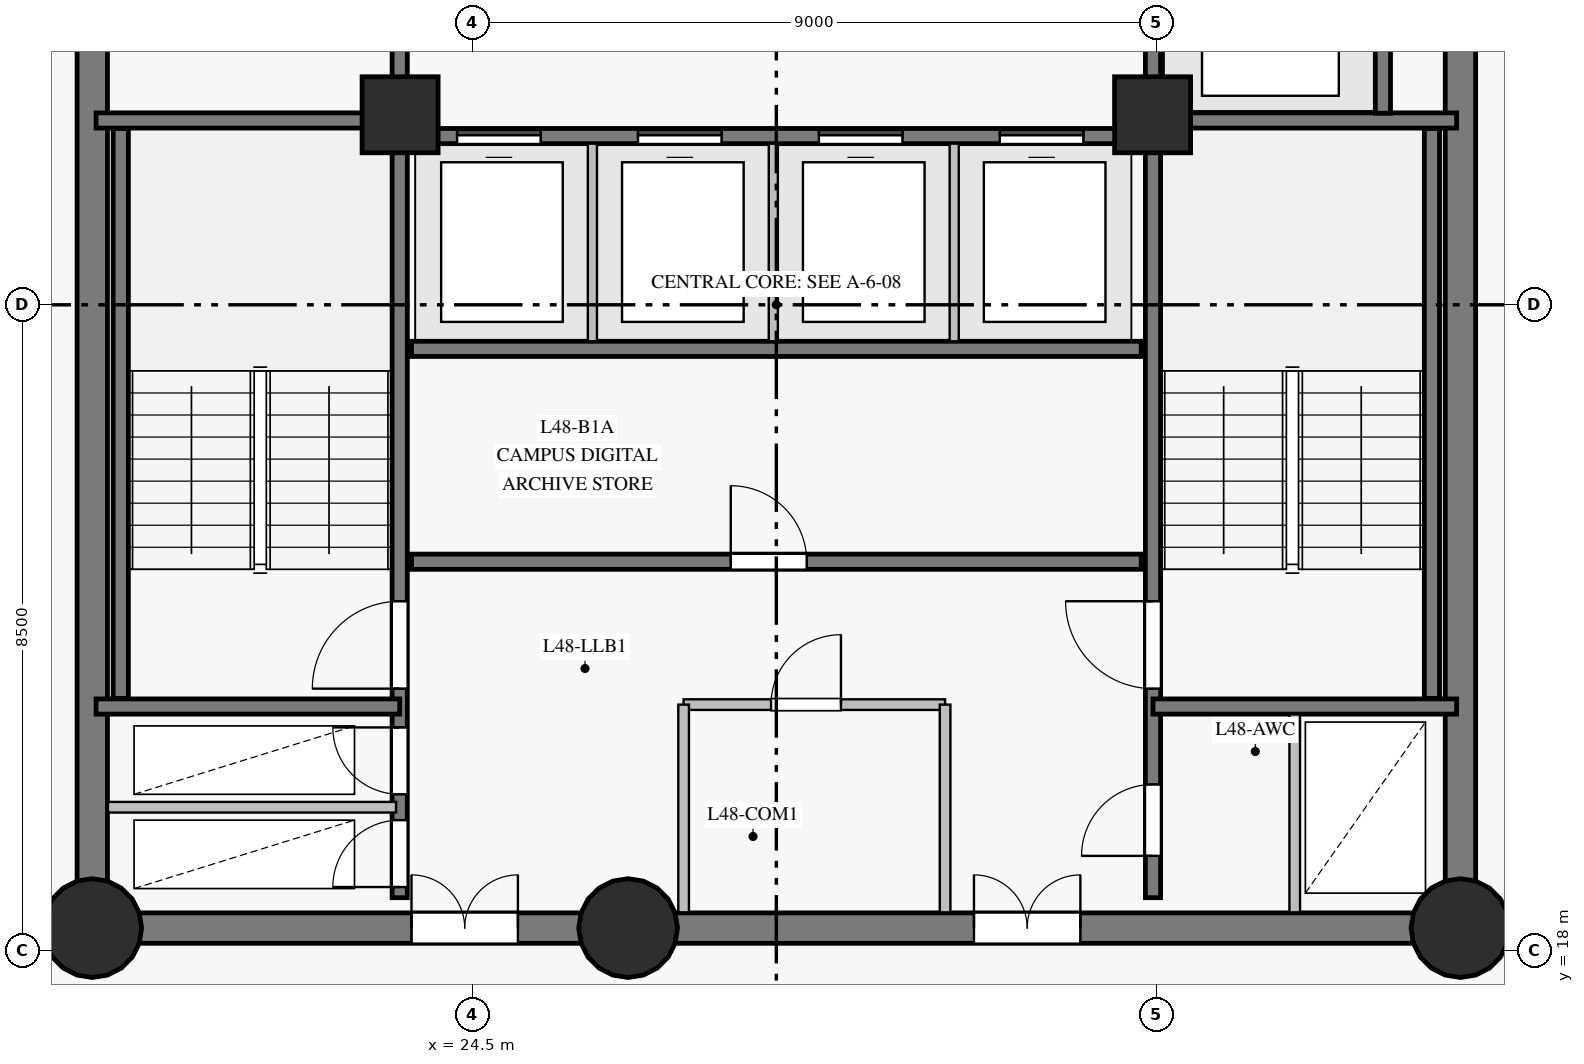
"""IFC4 building model, lengths in metres.
Left out: names, types, materials, properties, quantities, classifications, styles, units other than length and angle.
Written with IfcOpenShell. Run it as: python <this file> out.ifc"""

import sys

from ifc_helpers import new_model, si_unit, direction, frame, frame_2d, origin, origin_with_axes, origin_2d, place, context, subcontext, project, spatial, rectangle, circle, extrude, source, transform, mapped, element, fill, save


model = new_model("IFC4")
c1 = context("Model", 3, precision=1e-05, world=origin(), true_north=direction((0.0, 1.0)))
c2 = subcontext(c1, "Body", "Model", "MODEL_VIEW")
j1 = project(units=[si_unit("LENGTHUNIT", "METRE"), si_unit("PLANEANGLEUNIT", "RADIAN")], contexts=[c1])
p1 = place(None, origin())
s1 = spatial("IfcSite", under=j1, at=p1, CompositionType="ELEMENT")
p2 = place(p1, origin())
s2 = spatial("IfcBuilding", under=s1, at=p2, CompositionType="ELEMENT")
p3 = place(p2, frame((0.0, 0.0, 168.75)))
s3 = spatial("IfcBuildingStorey", under=s2, at=p3, CompositionType="ELEMENT", Elevation=168.75)
p4 = place(p3, frame((19.5, 18.3, 0.0), z_axis=(0.0, 0.0, 1.0), x_axis=(1.0, 0.0, 0.0)))
e1 = element("IfcWall", 1, at=p4, inside=s3, PredefinedType="SHEAR", context=c2, shape_type="SweptSolid", body=[
    extrude(rectangle(XDim=7.05, YDim=0.4, at=frame_2d((3.525, 0.0))), origin(), (0.0, 0.0, 1.0), 2.825),
])
p5 = place(p4, frame((4.2, 0.0, 0.0)))
e2 = element("IfcOpeningElement", 2, at=p5, cuts=e1, PredefinedType="OPENING", context=c2, shape_type="SweptSolid", body=[
    extrude(rectangle(XDim=1.4, YDim=2.2, at=frame_2d((0.7, 1.1))), frame((0.0, 0.21, 0.0), z_axis=(0.0, -1.0, 0.0), x_axis=(1.0, 0.0, 0.0)), (0.0, 0.0, 1.0), 0.42),
])
p6 = place(p3, frame((26.55, 18.3, 0.0), z_axis=(0.0, 0.0, 1.0), x_axis=(1.0, 0.0, 0.0)))
e3 = element("IfcWall", 3, at=p6, inside=s3, PredefinedType="SHEAR", context=c2, shape_type="SweptSolid", body=[
    extrude(rectangle(XDim=10.95, YDim=0.4, at=frame_2d((5.475, 0.0))), origin(), (0.0, 0.0, 1.0), 2.825),
])
p7 = place(p6, frame((4.55, 0.0, 0.0)))
e4 = element("IfcOpeningElement", 4, at=p7, cuts=e3, PredefinedType="OPENING", context=c2, shape_type="SweptSolid", body=[
    extrude(rectangle(XDim=1.4, YDim=2.2, at=frame_2d((0.7, 1.1))), frame((0.0, 0.21, 0.0), z_axis=(0.0, -1.0, 0.0), x_axis=(1.0, 0.0, 0.0)), (0.0, 0.0, 1.0), 0.42),
])
p8 = place(p3, frame((37.5, 18.3, 0.0), z_axis=(0.0, 0.0, 1.0), x_axis=(0.0, 1.0, 0.0)))
e5 = element("IfcWall", 5, at=p8, inside=s3, PredefinedType="SHEAR", context=c2, shape_type="SweptSolid", body=[
    extrude(rectangle(XDim=16.4, YDim=0.4, at=frame_2d((8.2, 0.0))), origin(), (0.0, 0.0, 1.0), 2.825),
])
p9 = place(p8, frame((14.15, 0.0, 0.0)))
e6 = element("IfcOpeningElement", 6, at=p9, cuts=e5, PredefinedType="OPENING", context=c2, shape_type="SweptSolid", body=[
    extrude(rectangle(XDim=1.2, YDim=2.15, at=frame_2d((0.6, 1.075))), frame((0.0, 0.21, 0.0), z_axis=(0.0, -1.0, 0.0), x_axis=(1.0, 0.0, 0.0)), (0.0, 0.0, 1.0), 0.42),
])
p10 = place(p3, frame((19.5, 34.7, 0.0), z_axis=(0.0, 0.0, 1.0), x_axis=(0.0, -1.0, 0.0)))
e7 = element("IfcWall", 7, at=p10, inside=s3, PredefinedType="SHEAR", context=c2, shape_type="SweptSolid", body=[
    extrude(rectangle(XDim=16.4, YDim=0.4, at=frame_2d((8.2, 0.0))), origin(), (0.0, 0.0, 1.0), 2.825),
])
p11 = place(p10, frame((3.1, 0.0, 0.0)))
e8 = element("IfcOpeningElement", 8, at=p11, cuts=e7, PredefinedType="OPENING", context=c2, shape_type="SweptSolid", body=[
    extrude(rectangle(XDim=1.1, YDim=2.15, at=frame_2d((0.55, 1.075))), frame((0.0, 0.21, 0.0), z_axis=(0.0, -1.0, 0.0), x_axis=(1.0, 0.0, 0.0)), (0.0, 0.0, 1.0), 0.42),
])
m1 = source(origin_with_axes(), c2, "Body", "SweptSolid", [
    extrude(circle(Radius=0.65, at=origin_2d()), origin(), (0.0, 0.0, 1.0), 3.05),
])
for number, where, z_axis, x_axis in (
    (9, (19.5, 18.3, 0.0), (0.0, 0.0, 1.0), (1.0, 0.0, 0.0)),
    (10, (26.55, 18.3, 0.0), (0.0, 0.0, 1.0), (1.0, 0.0, 0.0)),
    (11, (37.5, 18.3, 0.0), (0.0, 0.0, 1.0), (1.0, 0.0, 0.0)),
):
    element("IfcColumn", number, at=place(p3, frame(where, z_axis=z_axis, x_axis=x_axis)), inside=s3, PredefinedType="COLUMN", context=c2, shape_type="MappedRepresentation", body=[
        mapped(m1, transform((0.0, 0.0, 0.0), scale=1.0)),
    ])
m2 = source(origin_with_axes(), c2, "Body", "SweptSolid", [
    extrude(rectangle(XDim=1.0, YDim=1.0, at=origin_2d()), origin(), (0.0, 0.0, 1.0), 3.05),
])
for number, where, z_axis, x_axis in (
    (12, (23.55, 29.0, 0.0), (0.0, 0.0, 1.0), (1.0, 0.0, 0.0)),
    (13, (33.45, 29.0, 0.0), (0.0, 0.0, 1.0), (1.0, 0.0, 0.0)),
):
    element("IfcColumn", number, at=place(p3, frame(where, z_axis=z_axis, x_axis=x_axis)), inside=s3, PredefinedType="COLUMN", context=c2, shape_type="MappedRepresentation", body=[
        mapped(m2, transform((0.0, 0.0, 0.0), scale=1.0)),
    ])
p12 = place(p3, frame((23.545, 18.7, 0.0), z_axis=(0.0, 0.0, 1.0), x_axis=(0.0, 1.0, 0.0)))
e14 = element("IfcWall", 14, at=p12, inside=s3, PredefinedType="SHEAR", context=c2, shape_type="SweptSolid", body=[
    extrude(rectangle(XDim=15.6, YDim=0.2, at=frame_2d((7.8, 0.0))), origin(), (0.0, 0.0, 1.0), 2.825),
])
p13 = place(p12, frame((2.75, 0.0, 0.0)))
e15 = element("IfcOpeningElement", 15, at=p13, cuts=e14, PredefinedType="OPENING", context=c2, shape_type="SweptSolid", body=[
    extrude(rectangle(XDim=1.15, YDim=2.15, at=frame_2d((0.575, 1.075))), frame((0.0, 0.11, 0.0), z_axis=(0.0, -1.0, 0.0), x_axis=(1.0, 0.0, 0.0)), (0.0, 0.0, 1.0), 0.22),
])
p14 = place(p12, frame((0.14, 0.0, 0.0)))
e16 = element("IfcOpeningElement", 16, at=p14, cuts=e14, PredefinedType="OPENING", context=c2, shape_type="SweptSolid", body=[
    extrude(rectangle(XDim=0.88, YDim=2.1, at=frame_2d((0.44, 1.05))), frame((0.0, 0.11, 0.0), z_axis=(0.0, -1.0, 0.0), x_axis=(1.0, 0.0, 0.0)), (0.0, 0.0, 1.0), 0.22),
])
p15 = place(p12, frame((1.36, 0.0, 0.0)))
e17 = element("IfcOpeningElement", 17, at=p15, cuts=e14, PredefinedType="OPENING", context=c2, shape_type="SweptSolid", body=[
    extrude(rectangle(XDim=0.88, YDim=2.1, at=frame_2d((0.44, 1.05))), frame((0.0, 0.11, 0.0), z_axis=(0.0, -1.0, 0.0), x_axis=(1.0, 0.0, 0.0)), (0.0, 0.0, 1.0), 0.22),
])
p16 = place(p12, frame((12.1, 0.0, 0.0)))
e18 = element("IfcOpeningElement", 18, at=p16, cuts=e14, PredefinedType="OPENING", context=c2, shape_type="SweptSolid", body=[
    extrude(rectangle(XDim=1.12, YDim=2.15, at=frame_2d((0.56, 1.075))), frame((0.0, 0.11, 0.0), z_axis=(0.0, -1.0, 0.0), x_axis=(1.0, 0.0, 0.0)), (0.0, 0.0, 1.0), 0.22),
])
p17 = place(p12, frame((14.05, 0.0, 0.0)))
e19 = element("IfcOpeningElement", 19, at=p17, cuts=e14, PredefinedType="OPENING", context=c2, shape_type="SweptSolid", body=[
    extrude(rectangle(XDim=1.12, YDim=2.15, at=frame_2d((0.56, 1.075))), frame((0.0, 0.11, 0.0), z_axis=(0.0, -1.0, 0.0), x_axis=(1.0, 0.0, 0.0)), (0.0, 0.0, 1.0), 0.22),
])
p18 = place(p3, frame((33.455, 18.7, 0.0), z_axis=(0.0, 0.0, 1.0), x_axis=(0.0, 1.0, 0.0)))
e20 = element("IfcWall", 20, at=p18, inside=s3, PredefinedType="SHEAR", context=c2, shape_type="SweptSolid", body=[
    extrude(rectangle(XDim=15.6, YDim=0.2, at=frame_2d((7.8, 0.0))), origin(), (0.0, 0.0, 1.0), 2.825),
])
p19 = place(p18, frame((2.75, 0.0, 0.0)))
e21 = element("IfcOpeningElement", 21, at=p19, cuts=e20, PredefinedType="OPENING", context=c2, shape_type="SweptSolid", body=[
    extrude(rectangle(XDim=1.15, YDim=2.15, at=frame_2d((0.575, 1.075))), frame((0.0, 0.11, 0.0), z_axis=(0.0, -1.0, 0.0), x_axis=(1.0, 0.0, 0.0)), (0.0, 0.0, 1.0), 0.22),
])
p20 = place(p18, frame((0.55, 0.0, 0.0)))
e22 = element("IfcOpeningElement", 22, at=p20, cuts=e20, PredefinedType="OPENING", context=c2, shape_type="SweptSolid", body=[
    extrude(rectangle(XDim=0.94, YDim=2.1, at=frame_2d((0.47, 1.05))), frame((0.0, 0.11, 0.0), z_axis=(0.0, -1.0, 0.0), x_axis=(1.0, 0.0, 0.0)), (0.0, 0.0, 1.0), 0.22),
])
p21 = place(p3, frame((23.7, 23.12, 0.0), z_axis=(0.0, 0.0, 1.0), x_axis=(1.0, 0.0, 0.0)))
e23 = element("IfcWall", 23, at=p21, inside=s3, PredefinedType="SHEAR", context=c2, shape_type="SweptSolid", body=[
    extrude(rectangle(XDim=9.6, YDim=0.2, at=frame_2d((4.8, 0.0))), origin(), (0.0, 0.0, 1.0), 2.825),
])
p22 = place(p21, frame((4.2, 0.0, 0.0)))
e24 = element("IfcOpeningElement", 24, at=p22, cuts=e23, PredefinedType="OPENING", context=c2, shape_type="SweptSolid", body=[
    extrude(rectangle(XDim=1.0, YDim=2.15, at=frame_2d((0.5, 1.075))), frame((0.0, 0.11, 0.0), z_axis=(0.0, -1.0, 0.0), x_axis=(1.0, 0.0, 0.0)), (0.0, 0.0, 1.0), 0.22),
])
p23 = place(p3, frame((23.7, 25.92, 0.0), z_axis=(0.0, 0.0, 1.0), x_axis=(1.0, 0.0, 0.0)))
e25 = element("IfcWall", 25, at=p23, inside=s3, PredefinedType="SHEAR", context=c2, shape_type="SweptSolid", body=[
    extrude(rectangle(XDim=9.6, YDim=0.2, at=frame_2d((4.8, 0.0))), origin(), (0.0, 0.0, 1.0), 2.825),
])
p24 = place(p3, frame((23.7, 28.72, 0.0), z_axis=(0.0, 0.0, 1.0), x_axis=(1.0, 0.0, 0.0)))
e26 = element("IfcWall", 26, at=p24, inside=s3, PredefinedType="SHEAR", context=c2, shape_type="SweptSolid", body=[
    extrude(rectangle(XDim=9.6, YDim=0.2, at=frame_2d((4.8, 0.0))), origin(), (0.0, 0.0, 1.0), 2.825),
])
p25 = place(p24, frame((0.6, 0.0, 0.0)))
e27 = element("IfcOpeningElement", 27, at=p25, cuts=e26, PredefinedType="OPENING", context=c2, shape_type="SweptSolid", body=[
    extrude(rectangle(XDim=1.1, YDim=2.15, at=frame_2d((0.55, 1.075))), frame((0.0, 0.11, 0.0), z_axis=(0.0, -1.0, 0.0), x_axis=(1.0, 0.0, 0.0)), (0.0, 0.0, 1.0), 0.22),
])
p26 = place(p24, frame((2.98, 0.0, 0.0)))
e28 = element("IfcOpeningElement", 28, at=p26, cuts=e26, PredefinedType="OPENING", context=c2, shape_type="SweptSolid", body=[
    extrude(rectangle(XDim=1.1, YDim=2.15, at=frame_2d((0.55, 1.075))), frame((0.0, 0.11, 0.0), z_axis=(0.0, -1.0, 0.0), x_axis=(1.0, 0.0, 0.0)), (0.0, 0.0, 1.0), 0.22),
])
p27 = place(p24, frame((5.36, 0.0, 0.0)))
e29 = element("IfcOpeningElement", 29, at=p27, cuts=e26, PredefinedType="OPENING", context=c2, shape_type="SweptSolid", body=[
    extrude(rectangle(XDim=1.1, YDim=2.15, at=frame_2d((0.55, 1.075))), frame((0.0, 0.11, 0.0), z_axis=(0.0, -1.0, 0.0), x_axis=(1.0, 0.0, 0.0)), (0.0, 0.0, 1.0), 0.22),
])
p28 = place(p24, frame((7.74, 0.0, 0.0)))
e30 = element("IfcOpeningElement", 30, at=p28, cuts=e26, PredefinedType="OPENING", context=c2, shape_type="SweptSolid", body=[
    extrude(rectangle(XDim=1.1, YDim=2.15, at=frame_2d((0.55, 1.075))), frame((0.0, 0.11, 0.0), z_axis=(0.0, -1.0, 0.0), x_axis=(1.0, 0.0, 0.0)), (0.0, 0.0, 1.0), 0.22),
])
for number, where, z_axis, x_axis in (
    (31, (19.875, 21.32, 0.0), (0.0, 0.0, 1.0), (0.0, 1.0, 0.0)),
    (32, (37.125, 21.32, 0.0), (0.0, 0.0, 1.0), (0.0, 1.0, 0.0)),
):
    element("IfcWall", number, at=place(p3, frame(where, z_axis=z_axis, x_axis=x_axis)), inside=s3, PredefinedType="SHEAR", context=c2, shape_type="SweptSolid", body=[
        extrude(rectangle(XDim=7.5, YDim=0.2, at=frame_2d((3.75, 0.0))), origin(), (0.0, 0.0, 1.0), 2.825),
    ])
for number, where, z_axis, x_axis in (
    (33, (33.455, 21.215, 0.0), (0.0, 0.0, 1.0), (1.0, 0.0, 0.0)),
    (34, (33.455, 28.925, 0.0), (0.0, 0.0, 1.0), (1.0, 0.0, 0.0)),
    (35, (19.55, 21.215, 0.0), (0.0, 0.0, 1.0), (1.0, 0.0, 0.0)),
    (36, (19.55, 28.925, 0.0), (0.0, 0.0, 1.0), (1.0, 0.0, 0.0)),
):
    element("IfcWall", number, at=place(p3, frame(where, z_axis=z_axis, x_axis=x_axis)), inside=s3, PredefinedType="SHEAR", context=c2, shape_type="SweptSolid", body=[
        extrude(rectangle(XDim=3.995, YDim=0.2, at=frame_2d((1.998, 0.0))), origin(), (0.0, 0.0, 1.0), 2.825),
    ])
p29 = place(p3, frame((36.48, 29.02, 0.0), z_axis=(0.0, 0.0, 1.0), x_axis=(0.0, 1.0, 0.0)))
e37 = element("IfcWall", 37, at=p29, inside=s3, PredefinedType="SHEAR", context=c2, shape_type="SweptSolid", body=[
    extrude(rectangle(XDim=2.86, YDim=0.2, at=frame_2d((1.43, 0.0))), origin(), (0.0, 0.0, 1.0), 2.825),
])
p30 = place(p3, frame((19.707, 19.89, 0.0), z_axis=(0.0, 0.0, 1.0), x_axis=(1.0, 0.0, 0.0)))
e38 = element("IfcWall", 38, at=p30, inside=s3, PredefinedType="PARTITIONING", context=c2, shape_type="SweptSolid", body=[
    extrude(rectangle(XDim=3.79, YDim=0.14, at=frame_2d((1.895, 0.0))), origin(), (0.0, 0.0, 1.0), 2.825),
])
p31 = place(p3, frame((27.28, 21.24, 0.0), z_axis=(0.0, 0.0, 1.0), x_axis=(1.0, 0.0, 0.0)))
e39 = element("IfcWall", 39, at=p31, inside=s3, PredefinedType="PARTITIONING", context=c2, shape_type="SweptSolid", body=[
    extrude(rectangle(XDim=3.44, YDim=0.14, at=frame_2d((1.72, 0.0))), origin(), (0.0, 0.0, 1.0), 2.825),
])
p32 = place(p31, frame((1.15, 0.0, 0.0)))
e40 = element("IfcOpeningElement", 40, at=p32, cuts=e39, PredefinedType="OPENING", context=c2, shape_type="SweptSolid", body=[
    extrude(rectangle(XDim=0.92, YDim=2.1, at=frame_2d((0.46, 1.05))), frame((0.0, 0.08, 0.0), z_axis=(0.0, -1.0, 0.0), x_axis=(1.0, 0.0, 0.0)), (0.0, 0.0, 1.0), 0.16),
])
for number, where, z_axis, x_axis in (
    (41, (27.28, 18.507, 0.0), (0.0, 0.0, 1.0), (0.0, 1.0, 0.0)),
    (42, (30.72, 18.507, 0.0), (0.0, 0.0, 1.0), (0.0, 1.0, 0.0)),
):
    element("IfcWall", number, at=place(p3, frame(where, z_axis=z_axis, x_axis=x_axis)), inside=s3, PredefinedType="PARTITIONING", context=c2, shape_type="SweptSolid", body=[
        extrude(rectangle(XDim=2.733, YDim=0.14, at=frame_2d((1.366, 0.0))), origin(), (0.0, 0.0, 1.0), 2.825),
    ])
for number, where, z_axis, x_axis in (
    (43, (26.08, 26.02, 0.0), (0.0, 0.0, 1.0), (0.0, 1.0, 0.0)),
    (44, (28.46, 26.02, 0.0), (0.0, 0.0, 1.0), (0.0, 1.0, 0.0)),
    (45, (30.84, 26.02, 0.0), (0.0, 0.0, 1.0), (0.0, 1.0, 0.0)),
):
    element("IfcWall", number, at=place(p3, frame(where, z_axis=z_axis, x_axis=x_axis)), inside=s3, PredefinedType="PARTITIONING", context=c2, shape_type="SweptSolid", body=[
        extrude(rectangle(XDim=2.6, YDim=0.12, at=frame_2d((1.3, 0.0))), origin(), (0.0, 0.0, 1.0), 2.825),
    ])
p33 = place(p3, frame((35.32, 18.507, 0.0), z_axis=(0.0, 0.0, 1.0), x_axis=(0.0, 1.0, 0.0)))
e46 = element("IfcWall", 46, at=p33, inside=s3, PredefinedType="PARTITIONING", context=c2, shape_type="SweptSolid", body=[
    extrude(rectangle(XDim=2.604, YDim=0.14, at=frame_2d((1.302, 0.0))), origin(), (0.0, 0.0, 1.0), 2.825),
])
m3 = source(origin_with_axes(), c2, "Body", "SweptSolid", [
    extrude(rectangle(XDim=1.15, YDim=2.15, at=frame_2d((0.575, 1.075))), frame((0.0, 0.025, 0.0), z_axis=(0.0, -1.0, 0.0), x_axis=(1.0, 0.0, 0.0)), (0.0, 0.0, 1.0), 0.05),
])
p34 = place(p13, origin())
e47 = element("IfcDoor", 47, at=p34, inside=s3, OperationType="SINGLE_SWING_LEFT", PredefinedType="DOOR", context=c2, shape_type="MappedRepresentation", body=[
    mapped(m3, transform((0.0, 0.0, 0.0), scale=1.0)),
])
fill(e15, e47)
p35 = place(p19, origin())
e48 = element("IfcDoor", 48, at=p35, inside=s3, OperationType="SINGLE_SWING_RIGHT", PredefinedType="DOOR", context=c2, shape_type="MappedRepresentation", body=[
    mapped(m3, transform((0.0, 0.0, 0.0), scale=1.0)),
])
fill(e21, e48)
m4 = source(origin_with_axes(), c2, "Body", "SweptSolid", [
    extrude(rectangle(XDim=0.88, YDim=2.1, at=frame_2d((0.44, 1.05))), frame((0.0, 0.025, 0.0), z_axis=(0.0, -1.0, 0.0), x_axis=(1.0, 0.0, 0.0)), (0.0, 0.0, 1.0), 0.05),
])
p36 = place(p14, origin())
e49 = element("IfcDoor", 49, at=p36, inside=s3, OperationType="SINGLE_SWING_LEFT", PredefinedType="DOOR", context=c2, shape_type="MappedRepresentation", body=[
    mapped(m4, transform((0.0, 0.0, 0.0), scale=1.0)),
])
fill(e16, e49)
p37 = place(p15, origin())
e50 = element("IfcDoor", 50, at=p37, inside=s3, OperationType="SINGLE_SWING_RIGHT", PredefinedType="DOOR", context=c2, shape_type="MappedRepresentation", body=[
    mapped(m4, transform((0.0, 0.0, 0.0), scale=1.0)),
])
fill(e17, e50)
m5 = source(origin_with_axes(), c2, "Body", "SweptSolid", [
    extrude(rectangle(XDim=1.4, YDim=2.2, at=frame_2d((0.7, 1.1))), frame((0.0, 0.025, 0.0), z_axis=(0.0, -1.0, 0.0), x_axis=(1.0, 0.0, 0.0)), (0.0, 0.0, 1.0), 0.05),
])
p38 = place(p5, origin())
e51 = element("IfcDoor", 51, at=p38, inside=s3, OperationType="DOUBLE_DOOR_SINGLE_SWING", PredefinedType="DOOR", context=c2, shape_type="MappedRepresentation", body=[
    mapped(m5, transform((0.0, 0.0, 0.0), scale=1.0)),
])
fill(e2, e51)
p39 = place(p7, origin())
e52 = element("IfcDoor", 52, at=p39, inside=s3, OperationType="DOUBLE_DOOR_SINGLE_SWING", PredefinedType="DOOR", context=c2, shape_type="MappedRepresentation", body=[
    mapped(m5, transform((0.0, 0.0, 0.0), scale=1.0)),
])
fill(e4, e52)
m6 = source(origin_with_axes(), c2, "Body", "SweptSolid", [
    extrude(rectangle(XDim=0.94, YDim=2.1, at=frame_2d((0.47, 1.05))), frame((0.0, 0.025, 0.0), z_axis=(0.0, -1.0, 0.0), x_axis=(1.0, 0.0, 0.0)), (0.0, 0.0, 1.0), 0.05),
])
p40 = place(p20, origin())
e53 = element("IfcDoor", 53, at=p40, inside=s3, OperationType="SINGLE_SWING_LEFT", PredefinedType="DOOR", context=c2, shape_type="MappedRepresentation", body=[
    mapped(m6, transform((0.0, 0.0, 0.0), scale=1.0)),
])
fill(e22, e53)
m7 = source(origin_with_axes(), c2, "Body", "SweptSolid", [
    extrude(rectangle(XDim=0.92, YDim=2.1, at=frame_2d((0.46, 1.05))), frame((0.0, 0.025, 0.0), z_axis=(0.0, -1.0, 0.0), x_axis=(1.0, 0.0, 0.0)), (0.0, 0.0, 1.0), 0.05),
])
p41 = place(p32, origin())
e54 = element("IfcDoor", 54, at=p41, inside=s3, OperationType="SINGLE_SWING_RIGHT", PredefinedType="DOOR", context=c2, shape_type="MappedRepresentation", body=[
    mapped(m7, transform((0.0, 0.0, 0.0), scale=1.0)),
])
fill(e40, e54)
m8 = source(origin_with_axes(), c2, "Body", "SweptSolid", [
    extrude(rectangle(XDim=1.0, YDim=2.15, at=frame_2d((0.5, 1.075))), frame((0.0, 0.025, 0.0), z_axis=(0.0, -1.0, 0.0), x_axis=(1.0, 0.0, 0.0)), (0.0, 0.0, 1.0), 0.05),
])
p42 = place(p22, origin())
e55 = element("IfcDoor", 55, at=p42, inside=s3, OperationType="SINGLE_SWING_LEFT", PredefinedType="DOOR", context=c2, shape_type="MappedRepresentation", body=[
    mapped(m8, transform((0.0, 0.0, 0.0), scale=1.0)),
])
fill(e24, e55)
m9 = source(origin_with_axes(), c2, "Body", "SweptSolid", [
    extrude(rectangle(XDim=1.1, YDim=2.15, at=frame_2d((0.55, 1.075))), frame((0.0, 0.025, 0.0), z_axis=(0.0, -1.0, 0.0), x_axis=(1.0, 0.0, 0.0)), (0.0, 0.0, 1.0), 0.05),
])
p43 = place(p25, origin())
e56 = element("IfcDoor", 56, at=p43, inside=s3, OperationType="SLIDING_TO_LEFT", PredefinedType="DOOR", context=c2, shape_type="MappedRepresentation", body=[
    mapped(m9, transform((0.0, 0.0, 0.0), scale=1.0)),
])
fill(e27, e56)
p44 = place(p26, origin())
e57 = element("IfcDoor", 57, at=p44, inside=s3, OperationType="SLIDING_TO_RIGHT", PredefinedType="DOOR", context=c2, shape_type="MappedRepresentation", body=[
    mapped(m9, transform((0.0, 0.0, 0.0), scale=1.0)),
])
fill(e28, e57)
p45 = place(p27, origin())
e58 = element("IfcDoor", 58, at=p45, inside=s3, OperationType="SLIDING_TO_LEFT", PredefinedType="DOOR", context=c2, shape_type="MappedRepresentation", body=[
    mapped(m9, transform((0.0, 0.0, 0.0), scale=1.0)),
])
fill(e29, e58)
p46 = place(p28, origin())
e59 = element("IfcDoor", 59, at=p46, inside=s3, OperationType="SLIDING_TO_RIGHT", PredefinedType="DOOR", context=c2, shape_type="MappedRepresentation", body=[
    mapped(m9, transform((0.0, 0.0, 0.0), scale=1.0)),
])
fill(e30, e59)
save(model, sys.argv[1])
